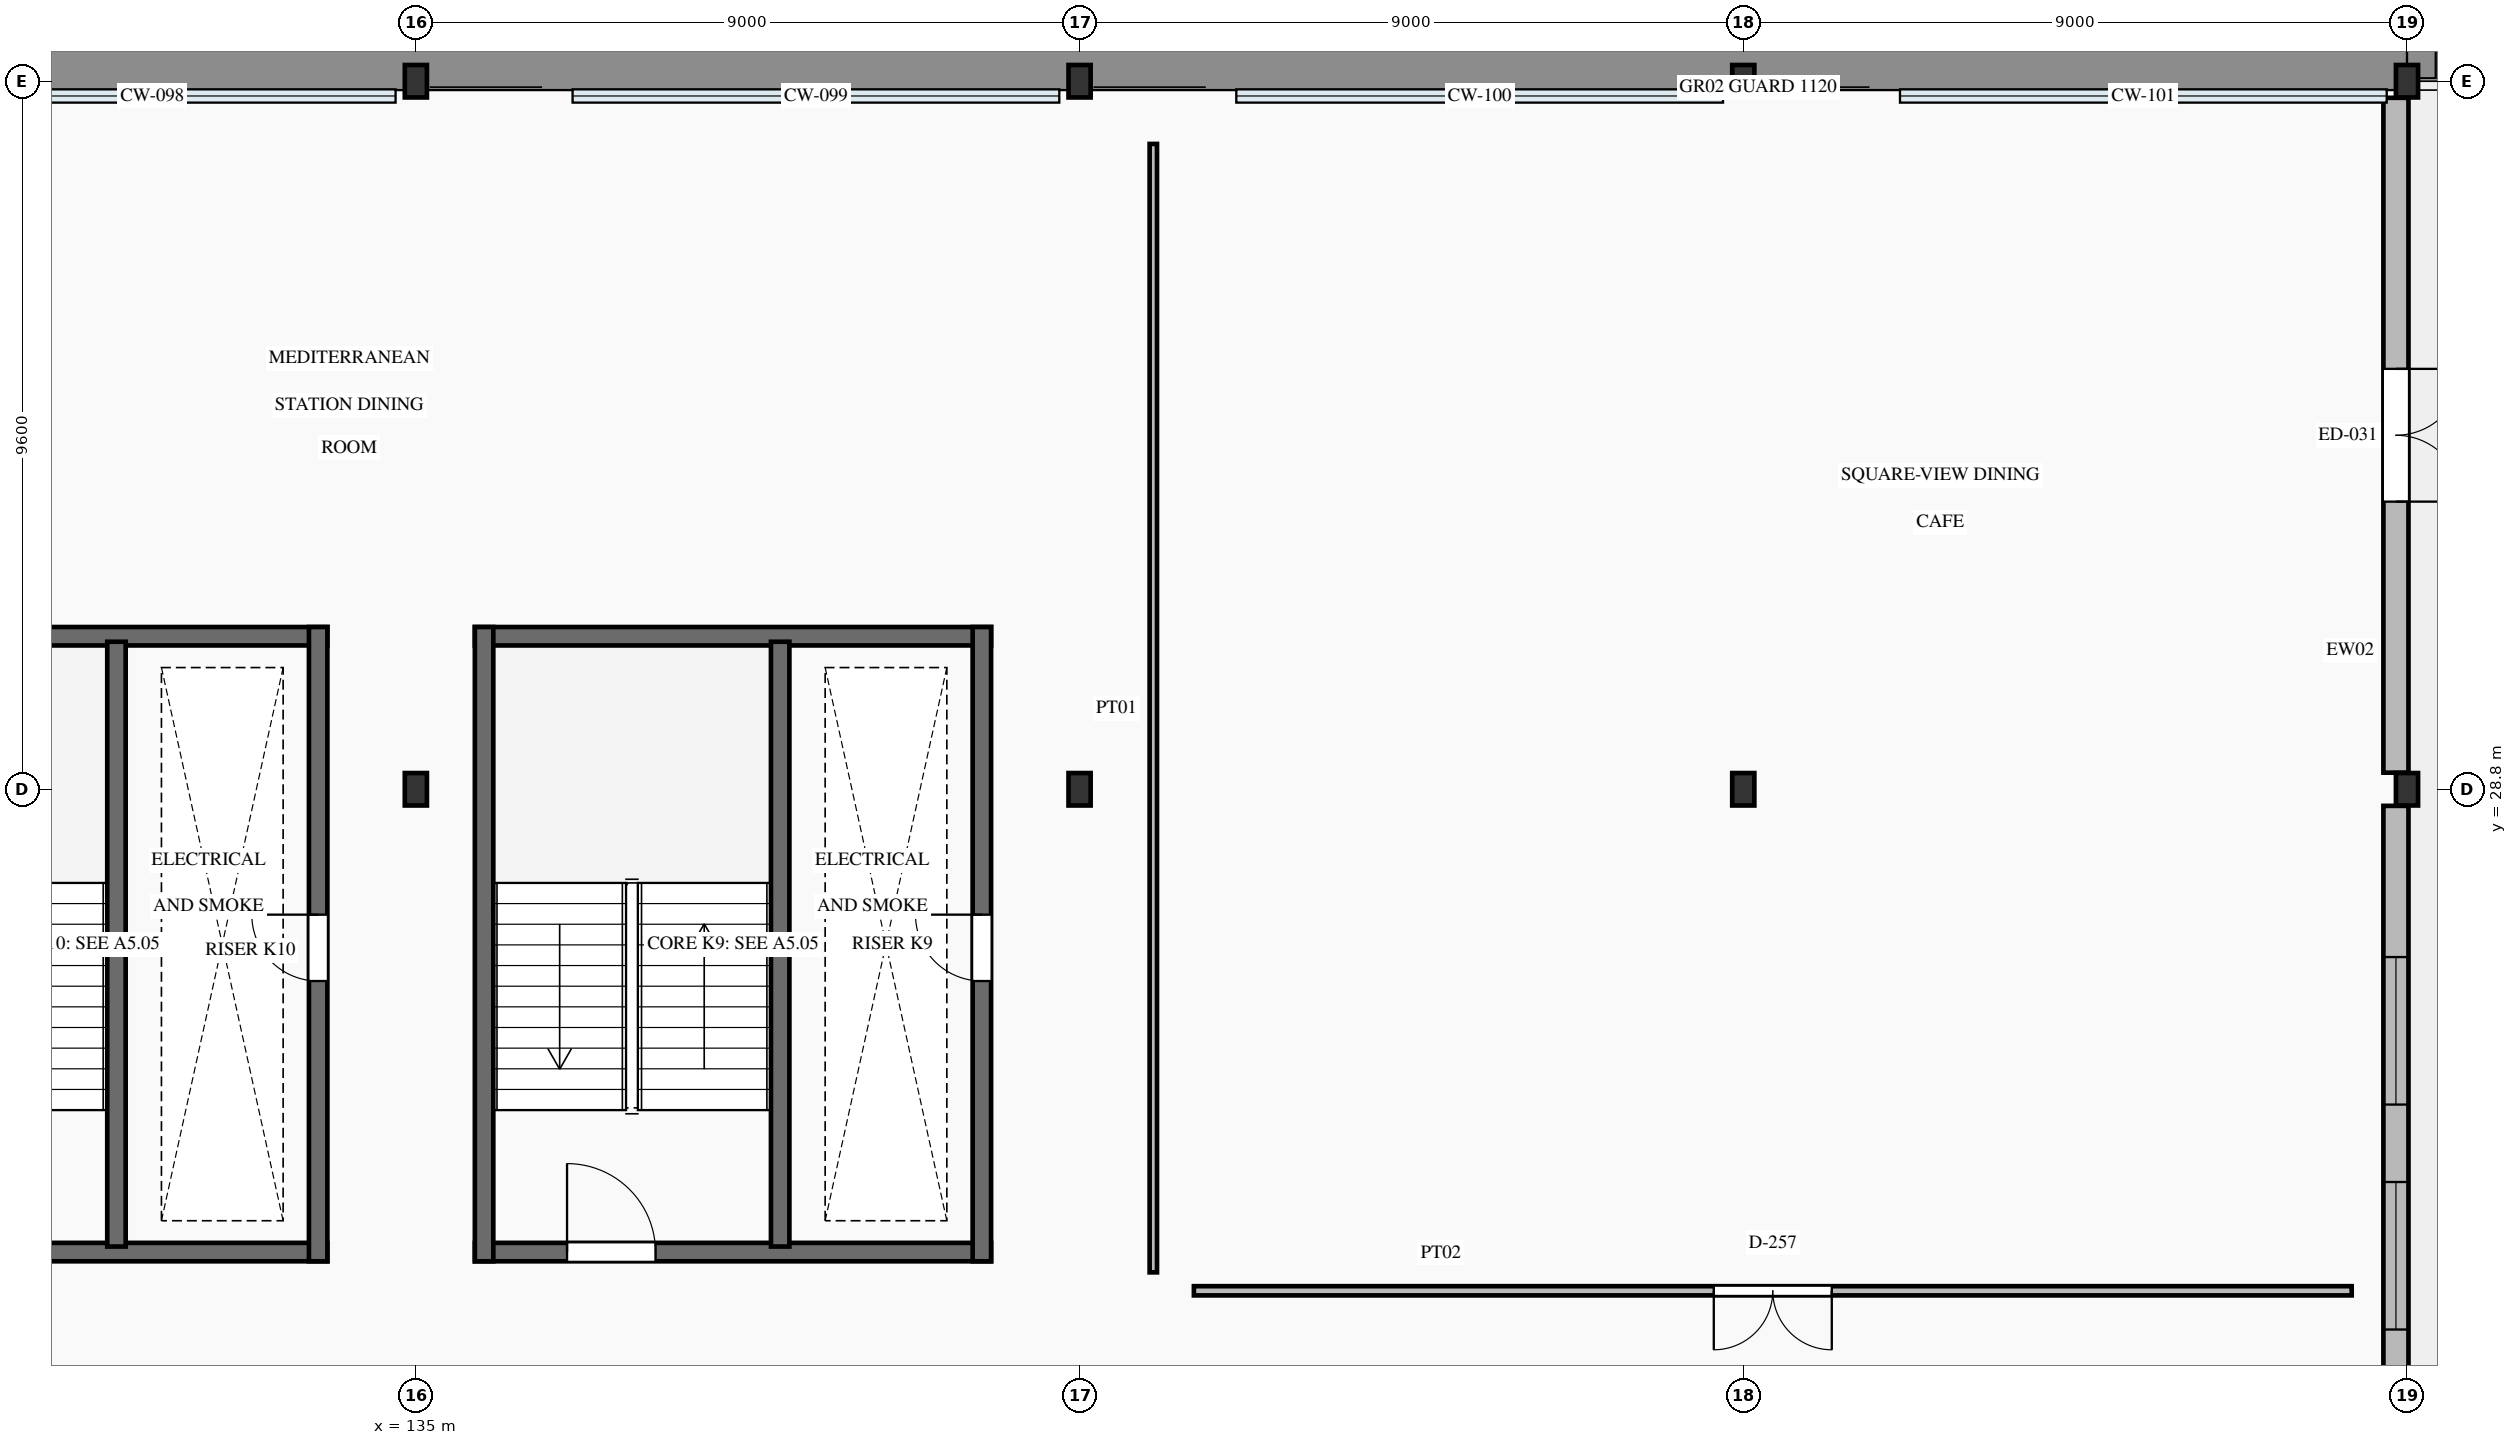
"""IFC4 building model, lengths in metres.
Left out: names, types, materials, properties, quantities, classifications, styles, units other than length and angle.
Written with IfcOpenShell. Run it as: python <this file> out.ifc"""

import sys

from ifc_helpers import new_model, si_unit, direction, frame, frame_2d, origin, origin_2d, place, context, subcontext, project, spatial, rectangle, i_section, extrude, element, fill, save


model = new_model("IFC4")
c1 = context("Model", 3, precision=1e-05, world=origin(), true_north=direction((0.0, 1.0)))
c2 = subcontext(c1, "Body", "Model", "MODEL_VIEW")
j1 = project(units=[si_unit("LENGTHUNIT", "METRE"), si_unit("PLANEANGLEUNIT", "RADIAN")], contexts=[c1])
p1 = place(None, origin())
s1 = spatial("IfcSite", under=j1, at=p1, CompositionType="ELEMENT")
p2 = place(p1, origin())
s2 = spatial("IfcBuilding", under=s1, at=p2, CompositionType="ELEMENT")
p3 = place(p2, frame((0.0, 0.0, 10.8)))
s3 = spatial("IfcBuildingStorey", under=s2, at=p3, CompositionType="ELEMENT", Elevation=10.8)
for number, where, z_axis, x_axis in (
    (1, (135.0, 28.8, 0.0), (0.0, 0.0, 1.0), (1.0, 0.0, 0.0)),
    (2, (135.0, 38.4, 0.0), (0.0, 0.0, 1.0), (1.0, 0.0, 0.0)),
    (3, (144.0, 28.8, 0.0), (0.0, 0.0, 1.0), (1.0, 0.0, 0.0)),
    (4, (144.0, 38.4, 0.0), (0.0, 0.0, 1.0), (1.0, 0.0, 0.0)),
    (5, (153.0, 28.8, 0.0), (0.0, 0.0, 1.0), (1.0, 0.0, 0.0)),
    (6, (153.0, 38.4, 0.0), (0.0, 0.0, 1.0), (1.0, 0.0, 0.0)),
    (7, (162.0, 28.8, 0.0), (0.0, 0.0, 1.0), (1.0, 0.0, 0.0)),
    (8, (162.0, 38.4, 0.0), (0.0, 0.0, 1.0), (1.0, 0.0, 0.0)),
):
    element("IfcColumn", number, at=place(p3, frame(where, z_axis=z_axis, x_axis=x_axis)), inside=s3, PredefinedType="COLUMN", context=c2, shape_type="SweptSolid", body=[
        extrude(i_section(OverallWidth=0.3, OverallDepth=0.44, WebThickness=0.011, FlangeThickness=0.021, FilletRadius=0.027, at=origin_2d()), origin(), (0.0, 0.0, 1.0), 4.2),
    ])
p4 = place(p3, frame((161.85, 19.425, 0.0), z_axis=(0.0, 0.0, 1.0), x_axis=(0.0, 1.0, 0.0)))
e9 = element("IfcWall", 9, at=p4, inside=s3, PredefinedType="SOLIDWALL", context=c2, shape_type="SweptSolid", body=[
    extrude(rectangle(XDim=9.15, YDim=0.34, at=frame_2d((4.575, 0.0))), origin(), (0.0, 0.0, 1.0), 3.645),
])
p5 = place(p4, frame((2.05, 0.0, 0.95)))
e10 = element("IfcOpeningElement", 10, at=p5, cuts=e9, PredefinedType="OPENING", context=c2, shape_type="SweptSolid", body=[
    extrude(rectangle(XDim=2.0, YDim=2.4, at=frame_2d((1.0, 1.2))), frame((0.0, 0.185, 0.0), z_axis=(0.0, -1.0, 0.0), x_axis=(1.0, 0.0, 0.0)), (0.0, 0.0, 1.0), 0.37),
])
p6 = place(p4, frame((5.1, 0.0, 0.95)))
e11 = element("IfcOpeningElement", 11, at=p6, cuts=e9, PredefinedType="OPENING", context=c2, shape_type="SweptSolid", body=[
    extrude(rectangle(XDim=2.0, YDim=2.4, at=frame_2d((1.0, 1.2))), frame((0.0, 0.185, 0.0), z_axis=(0.0, -1.0, 0.0), x_axis=(1.0, 0.0, 0.0)), (0.0, 0.0, 1.0), 0.37),
])
p7 = place(p3, frame((161.85, 29.025, 0.0), z_axis=(0.0, 0.0, 1.0), x_axis=(0.0, 1.0, 0.0)))
e12 = element("IfcWall", 12, at=p7, inside=s3, PredefinedType="SOLIDWALL", context=c2, shape_type="SweptSolid", body=[
    extrude(rectangle(XDim=9.15, YDim=0.34, at=frame_2d((4.575, 0.0))), origin(), (0.0, 0.0, 1.0), 3.645),
])
p8 = place(p7, frame((3.675, 0.0, 0.0)))
e13 = element("IfcOpeningElement", 13, at=p8, cuts=e12, PredefinedType="OPENING", context=c2, shape_type="SweptSolid", body=[
    extrude(rectangle(XDim=1.8, YDim=2.3, at=frame_2d((0.9, 1.15))), frame((0.0, 0.185, 0.0), z_axis=(0.0, -1.0, 0.0), x_axis=(1.0, 0.0, 0.0)), (0.0, 0.0, 1.0), 0.37),
])
p9 = place(p3, frame((135.8, 22.525, 0.0), z_axis=(0.0, 0.0, 1.0), x_axis=(1.0, 0.0, 0.0)))
e14 = element("IfcWall", 14, at=p9, inside=s3, PredefinedType="SHEAR", context=c2, shape_type="SweptSolid", body=[
    extrude(rectangle(XDim=7.0, YDim=0.25, at=frame_2d((3.5, 0.0))), origin(), (0.0, 0.0, 1.0), 4.2),
])
p10 = place(p9, frame((1.25, 0.0, 0.0)))
e15 = element("IfcOpeningElement", 15, at=p10, cuts=e14, PredefinedType="OPENING", context=c2, shape_type="SweptSolid", body=[
    extrude(rectangle(XDim=1.2, YDim=2.15, at=frame_2d((0.6, 1.075))), frame((0.0, 0.14, 0.0), z_axis=(0.0, -1.0, 0.0), x_axis=(1.0, 0.0, 0.0)), (0.0, 0.0, 1.0), 0.28),
])
p11 = place(p3, frame((135.8, 30.875, 0.0), z_axis=(0.0, 0.0, 1.0), x_axis=(1.0, 0.0, 0.0)))
e16 = element("IfcWall", 16, at=p11, inside=s3, PredefinedType="SHEAR", context=c2, shape_type="SweptSolid", body=[
    extrude(rectangle(XDim=7.0, YDim=0.25, at=frame_2d((3.5, 0.0))), origin(), (0.0, 0.0, 1.0), 4.2),
])
p12 = place(p3, frame((135.925, 22.4, 0.0), z_axis=(0.0, 0.0, 1.0), x_axis=(0.0, 1.0, 0.0)))
e17 = element("IfcWall", 17, at=p12, inside=s3, PredefinedType="SHEAR", context=c2, shape_type="SweptSolid", body=[
    extrude(rectangle(XDim=8.6, YDim=0.25, at=frame_2d((4.3, 0.0))), origin(), (0.0, 0.0, 1.0), 4.2),
])
p13 = place(p3, frame((142.675, 22.4, 0.0), z_axis=(0.0, 0.0, 1.0), x_axis=(0.0, 1.0, 0.0)))
e18 = element("IfcWall", 18, at=p13, inside=s3, PredefinedType="SHEAR", context=c2, shape_type="SweptSolid", body=[
    extrude(rectangle(XDim=8.6, YDim=0.25, at=frame_2d((4.3, 0.0))), origin(), (0.0, 0.0, 1.0), 4.2),
])
p14 = place(p13, frame((3.8, 0.0, 0.0)))
e19 = element("IfcOpeningElement", 19, at=p14, cuts=e18, PredefinedType="OPENING", context=c2, shape_type="SweptSolid", body=[
    extrude(rectangle(XDim=0.9, YDim=2.05, at=frame_2d((0.45, 1.025))), frame((0.0, 0.14, 0.0), z_axis=(0.0, -1.0, 0.0), x_axis=(1.0, 0.0, 0.0)), (0.0, 0.0, 1.0), 0.28),
])
p15 = place(p3, frame((139.94, 22.6, 0.0), z_axis=(0.0, 0.0, 1.0), x_axis=(0.0, 1.0, 0.0)))
e20 = element("IfcWall", 20, at=p15, inside=s3, PredefinedType="SHEAR", context=c2, shape_type="SweptSolid", body=[
    extrude(rectangle(XDim=8.2, YDim=0.25, at=frame_2d((4.1, 0.0))), origin(), (0.0, 0.0, 1.0), 4.2),
])
p16 = place(p3, frame((126.8, 22.525, 0.0), z_axis=(0.0, 0.0, 1.0), x_axis=(1.0, 0.0, 0.0)))
e21 = element("IfcWall", 21, at=p16, inside=s3, PredefinedType="SHEAR", context=c2, shape_type="SweptSolid", body=[
    extrude(rectangle(XDim=7.0, YDim=0.25, at=frame_2d((3.5, 0.0))), origin(), (0.0, 0.0, 1.0), 4.2),
])
p17 = place(p16, frame((1.25, 0.0, 0.0)))
e22 = element("IfcOpeningElement", 22, at=p17, cuts=e21, PredefinedType="OPENING", context=c2, shape_type="SweptSolid", body=[
    extrude(rectangle(XDim=1.2, YDim=2.15, at=frame_2d((0.6, 1.075))), frame((0.0, 0.14, 0.0), z_axis=(0.0, -1.0, 0.0), x_axis=(1.0, 0.0, 0.0)), (0.0, 0.0, 1.0), 0.28),
])
p18 = place(p3, frame((126.8, 30.875, 0.0), z_axis=(0.0, 0.0, 1.0), x_axis=(1.0, 0.0, 0.0)))
e23 = element("IfcWall", 23, at=p18, inside=s3, PredefinedType="SHEAR", context=c2, shape_type="SweptSolid", body=[
    extrude(rectangle(XDim=7.0, YDim=0.25, at=frame_2d((3.5, 0.0))), origin(), (0.0, 0.0, 1.0), 4.2),
])
p19 = place(p3, frame((133.675, 22.4, 0.0), z_axis=(0.0, 0.0, 1.0), x_axis=(0.0, 1.0, 0.0)))
e24 = element("IfcWall", 24, at=p19, inside=s3, PredefinedType="SHEAR", context=c2, shape_type="SweptSolid", body=[
    extrude(rectangle(XDim=8.6, YDim=0.25, at=frame_2d((4.3, 0.0))), origin(), (0.0, 0.0, 1.0), 4.2),
])
p20 = place(p19, frame((3.8, 0.0, 0.0)))
e25 = element("IfcOpeningElement", 25, at=p20, cuts=e24, PredefinedType="OPENING", context=c2, shape_type="SweptSolid", body=[
    extrude(rectangle(XDim=0.9, YDim=2.05, at=frame_2d((0.45, 1.025))), frame((0.0, 0.14, 0.0), z_axis=(0.0, -1.0, 0.0), x_axis=(1.0, 0.0, 0.0)), (0.0, 0.0, 1.0), 0.28),
])
p21 = place(p3, frame((130.94, 22.6, 0.0), z_axis=(0.0, 0.0, 1.0), x_axis=(0.0, 1.0, 0.0)))
e26 = element("IfcWall", 26, at=p21, inside=s3, PredefinedType="SHEAR", context=c2, shape_type="SweptSolid", body=[
    extrude(rectangle(XDim=8.2, YDim=0.25, at=frame_2d((4.1, 0.0))), origin(), (0.0, 0.0, 1.0), 4.2),
])
p22 = place(p3, frame((145.55, 22.0, 0.0), z_axis=(0.0, 0.0, 1.0), x_axis=(1.0, 0.0, 0.0)))
e27 = element("IfcWall", 27, at=p22, inside=s3, PredefinedType="PARTITIONING", context=c2, shape_type="SweptSolid", body=[
    extrude(rectangle(XDim=15.7, YDim=0.125, at=frame_2d((7.85, 0.0))), origin(), (0.0, 0.0, 1.0), 3.94),
])
p23 = place(p22, frame((7.05, 0.0, 0.0)))
e28 = element("IfcOpeningElement", 28, at=p23, cuts=e27, PredefinedType="OPENING", context=c2, shape_type="SweptSolid", body=[
    extrude(rectangle(XDim=1.6, YDim=2.25, at=frame_2d((0.8, 1.125))), frame((0.0, 0.077, 0.0), z_axis=(0.0, -1.0, 0.0), x_axis=(1.0, 0.0, 0.0)), (0.0, 0.0, 1.0), 0.155),
])
p24 = place(p3, frame((145.0, 22.25, 0.0), z_axis=(0.0, 0.0, 1.0), x_axis=(0.0, 1.0, 0.0)))
e29 = element("IfcWall", 29, at=p24, inside=s3, PredefinedType="PARTITIONING", context=c2, shape_type="SweptSolid", body=[
    extrude(rectangle(XDim=15.3, YDim=0.1, at=frame_2d((7.65, 0.0))), origin(), (0.0, 0.0, 1.0), 3.94),
])
p25 = place(p5, origin())
e30 = element("IfcWindow", 30, at=p25, inside=s3, PartitioningType="SINGLE_PANEL", PredefinedType="WINDOW", context=c2, shape_type="SweptSolid", body=[
    extrude(rectangle(XDim=2.0, YDim=2.4, at=frame_2d((1.0, 1.2))), frame((0.0, 0.03, 0.0), z_axis=(0.0, -1.0, 0.0), x_axis=(1.0, 0.0, 0.0)), (0.0, 0.0, 1.0), 0.06),
])
fill(e10, e30)
p26 = place(p6, origin())
e31 = element("IfcWindow", 31, at=p26, inside=s3, PartitioningType="SINGLE_PANEL", PredefinedType="WINDOW", context=c2, shape_type="SweptSolid", body=[
    extrude(rectangle(XDim=2.0, YDim=2.4, at=frame_2d((1.0, 1.2))), frame((0.0, 0.03, 0.0), z_axis=(0.0, -1.0, 0.0), x_axis=(1.0, 0.0, 0.0)), (0.0, 0.0, 1.0), 0.06),
])
fill(e11, e31)
p27 = place(p8, frame((1.8, 0.0, 0.0), z_axis=(0.0, 0.0, 1.0), x_axis=(-1.0, 0.0, 0.0)))
e32 = element("IfcDoor", 32, at=p27, inside=s3, OperationType="DOUBLE_DOOR_SINGLE_SWING", PredefinedType="DOOR", context=c2, shape_type="SweptSolid", body=[
    extrude(rectangle(XDim=1.8, YDim=2.3, at=frame_2d((0.9, 1.15))), frame((0.0, 0.025, 0.0), z_axis=(0.0, -1.0, 0.0), x_axis=(1.0, 0.0, 0.0)), (0.0, 0.0, 1.0), 0.05),
])
fill(e13, e32)
p28 = place(p10, origin())
e33 = element("IfcDoor", 33, at=p28, inside=s3, OperationType="SINGLE_SWING_LEFT", PredefinedType="DOOR", context=c2, shape_type="SweptSolid", body=[
    extrude(rectangle(XDim=1.2, YDim=2.15, at=frame_2d((0.6, 1.075))), frame((0.0, 0.025, 0.0), z_axis=(0.0, -1.0, 0.0), x_axis=(1.0, 0.0, 0.0)), (0.0, 0.0, 1.0), 0.05),
])
fill(e15, e33)
p29 = place(p14, origin())
e34 = element("IfcDoor", 34, at=p29, inside=s3, OperationType="SINGLE_SWING_RIGHT", PredefinedType="DOOR", context=c2, shape_type="SweptSolid", body=[
    extrude(rectangle(XDim=0.9, YDim=2.05, at=frame_2d((0.45, 1.025))), frame((0.0, 0.025, 0.0), z_axis=(0.0, -1.0, 0.0), x_axis=(1.0, 0.0, 0.0)), (0.0, 0.0, 1.0), 0.05),
])
fill(e19, e34)
p30 = place(p20, origin())
e35 = element("IfcDoor", 35, at=p30, inside=s3, OperationType="SINGLE_SWING_RIGHT", PredefinedType="DOOR", context=c2, shape_type="SweptSolid", body=[
    extrude(rectangle(XDim=0.9, YDim=2.05, at=frame_2d((0.45, 1.025))), frame((0.0, 0.025, 0.0), z_axis=(0.0, -1.0, 0.0), x_axis=(1.0, 0.0, 0.0)), (0.0, 0.0, 1.0), 0.05),
])
fill(e25, e35)
p31 = place(p23, frame((1.6, 0.0, 0.0), z_axis=(0.0, 0.0, 1.0), x_axis=(-1.0, 0.0, 0.0)))
e36 = element("IfcDoor", 36, at=p31, inside=s3, OperationType="DOUBLE_DOOR_SINGLE_SWING", PredefinedType="DOOR", context=c2, shape_type="SweptSolid", body=[
    extrude(rectangle(XDim=1.6, YDim=2.25, at=frame_2d((0.8, 1.125))), frame((0.0, 0.025, 0.0), z_axis=(0.0, -1.0, 0.0), x_axis=(1.0, 0.0, 0.0)), (0.0, 0.0, 1.0), 0.05),
])
fill(e28, e36)
save(model, sys.argv[1])
